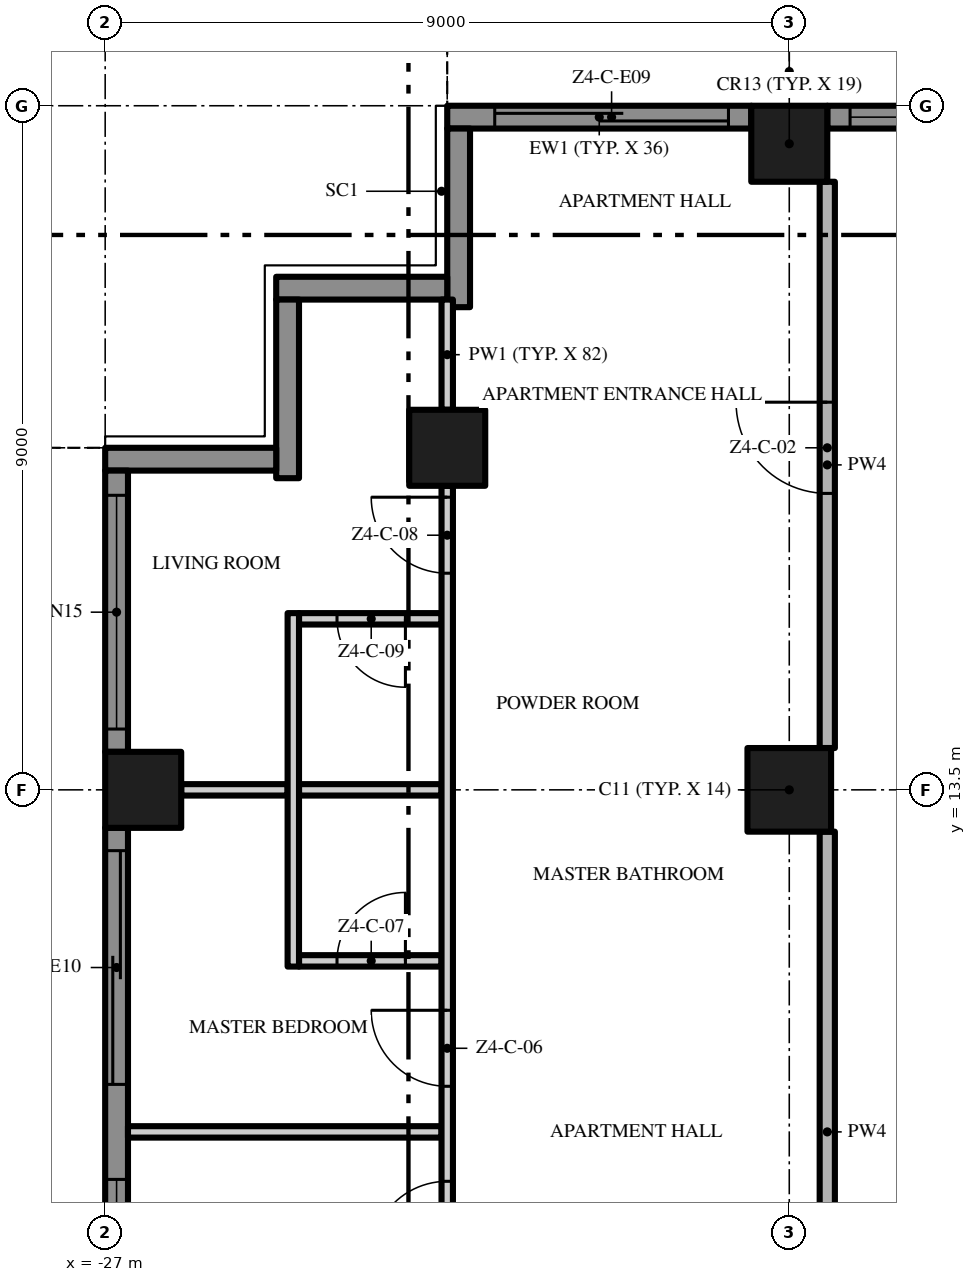
"""IFC4 building model, lengths in metres.
Left out: names, types, materials, properties, quantities, classifications, styles, units other than length and angle.
Written with IfcOpenShell. Run it as: python <this file> out.ifc"""

import sys

from ifc_helpers import new_model, si_unit, direction, frame, frame_2d, origin, origin_2d, place, context, subcontext, project, spatial, polyline, rectangle, outline, extrude, element, fill, save


model = new_model("IFC4")
c1 = context("Model", 3, precision=1e-05, world=origin(), true_north=direction((0.0, 1.0)))
c2 = subcontext(c1, "Body", "Model", "MODEL_VIEW")
j1 = project(units=[si_unit("LENGTHUNIT", "METRE"), si_unit("PLANEANGLEUNIT", "RADIAN")], contexts=[c1])
p1 = place(None, origin())
s1 = spatial("IfcSite", under=j1, at=p1, CompositionType="ELEMENT")
p2 = place(p1, origin())
s2 = spatial("IfcBuilding", under=s1, at=p2, CompositionType="ELEMENT")
p3 = place(p2, frame((0.0, 0.0, 207.2)))
s3 = spatial("IfcBuildingStorey", under=s2, at=p3, CompositionType="ELEMENT", Elevation=207.2)
p4 = place(p3, frame((-18.0, 13.5, 0.0), z_axis=(0.0, 0.0, 1.0), x_axis=(1.0, 0.0, 0.0)))
e1 = element("IfcColumn", 1, at=p4, inside=s3, PredefinedType="COLUMN", context=c2, shape_type="SweptSolid", body=[
    extrude(rectangle(XDim=1.1, YDim=1.1, at=origin_2d()), origin(), (0.0, 0.0, 1.0), 3.5),
])
for number, where, z_axis, x_axis in (
    (2, (-18.0, 22.0, 0.0), (0.0, 0.0, 1.0), (1.0, 0.0, 0.0)),
    (3, (-26.5, 13.5, 0.0), (0.0, 0.0, 1.0), (1.0, 0.0, 0.0)),
    (4, (-22.5, 18.0, 0.0), (0.0, 0.0, 1.0), (1.0, 0.0, 0.0)),
):
    element("IfcColumn", number, at=place(p3, frame(where, z_axis=z_axis, x_axis=x_axis)), inside=s3, PredefinedType="COLUMN", context=c2, shape_type="SweptSolid", body=[
        extrude(rectangle(XDim=1.0, YDim=1.0, at=origin_2d()), origin(), (0.0, 0.0, 1.0), 3.5),
    ])
p5 = place(p3, frame((-17.5, 22.35, 0.0), z_axis=(0.0, 0.0, 1.0), x_axis=(1.0, 0.0, 0.0)))
e5 = element("IfcWall", 5, at=p5, inside=s3, PredefinedType="SOLIDWALL", context=c2, shape_type="SweptSolid", body=[
    extrude(rectangle(XDim=4.0, YDim=0.3, at=frame_2d((2.0, 0.0))), origin(), (0.0, 0.0, 1.0), 3.5),
])
p6 = place(p5, frame((0.3, 0.0, 0.45)))
e6 = element("IfcOpeningElement", 6, at=p6, cuts=e5, PredefinedType="OPENING", context=c2, shape_type="SweptSolid", body=[
    extrude(rectangle(XDim=3.075, YDim=2.65, at=frame_2d((1.538, 1.325))), frame((0.0, 0.16, 0.0), z_axis=(0.0, -1.0, 0.0), x_axis=(1.0, 0.0, 0.0)), (0.0, 0.0, 1.0), 0.32),
])
p7 = place(p3, frame((-22.5, 22.35, 0.0), z_axis=(0.0, 0.0, 1.0), x_axis=(1.0, 0.0, 0.0)))
e7 = element("IfcWall", 7, at=p7, inside=s3, PredefinedType="SOLIDWALL", context=c2, shape_type="SweptSolid", body=[
    extrude(rectangle(XDim=4.0, YDim=0.3, at=frame_2d((2.0, 0.0))), origin(), (0.0, 0.0, 1.0), 3.5),
])
p8 = place(p7, frame((0.625, 0.0, 0.0)))
e8 = element("IfcOpeningElement", 8, at=p8, cuts=e7, PredefinedType="OPENING", context=c2, shape_type="SweptSolid", body=[
    extrude(rectangle(XDim=3.075, YDim=2.4, at=frame_2d((1.538, 1.2))), frame((0.0, 0.16, 0.0), z_axis=(0.0, -1.0, 0.0), x_axis=(1.0, 0.0, 0.0)), (0.0, 0.0, 1.0), 0.32),
])
p9 = place(p3, frame((-22.35, 19.85, 0.0), z_axis=(0.0, 0.0, 1.0), x_axis=(0.0, 1.0, 0.0)))
e9 = element("IfcWall", 9, at=p9, inside=s3, PredefinedType="SOLIDWALL", context=c2, shape_type="SweptSolid", body=[
    extrude(rectangle(XDim=2.35, YDim=0.3, at=frame_2d((1.175, 0.0))), origin(), (0.0, 0.0, 1.0), 3.5),
])
p10 = place(p3, frame((-24.75, 20.1, 0.0), z_axis=(0.0, 0.0, 1.0), x_axis=(1.0, 0.0, 0.0)))
e10 = element("IfcWall", 10, at=p10, inside=s3, PredefinedType="SOLIDWALL", context=c2, shape_type="SweptSolid", body=[
    extrude(rectangle(XDim=2.25, YDim=0.3, at=frame_2d((1.125, 0.0))), origin(), (0.0, 0.0, 1.0), 3.5),
])
p11 = place(p3, frame((-24.6, 17.6, 0.0), z_axis=(0.0, 0.0, 1.0), x_axis=(0.0, 1.0, 0.0)))
e11 = element("IfcWall", 11, at=p11, inside=s3, PredefinedType="SOLIDWALL", context=c2, shape_type="SweptSolid", body=[
    extrude(rectangle(XDim=2.35, YDim=0.3, at=frame_2d((1.175, 0.0))), origin(), (0.0, 0.0, 1.0), 3.5),
])
p12 = place(p3, frame((-27.0, 17.85, 0.0), z_axis=(0.0, 0.0, 1.0), x_axis=(1.0, 0.0, 0.0)))
e12 = element("IfcWall", 12, at=p12, inside=s3, PredefinedType="SOLIDWALL", context=c2, shape_type="SweptSolid", body=[
    extrude(rectangle(XDim=2.25, YDim=0.3, at=frame_2d((1.125, 0.0))), origin(), (0.0, 0.0, 1.0), 3.5),
])
p13 = place(p3, frame((-26.85, 14.0, 0.0), z_axis=(0.0, 0.0, 1.0), x_axis=(0.0, 1.0, 0.0)))
e13 = element("IfcWall", 13, at=p13, inside=s3, PredefinedType="SOLIDWALL", context=c2, shape_type="SweptSolid", body=[
    extrude(rectangle(XDim=3.7, YDim=0.3, at=frame_2d((1.85, 0.0))), origin(), (0.0, 0.0, 1.0), 3.5),
])
p14 = place(p13, frame((0.3, 0.0, 0.45)))
e14 = element("IfcOpeningElement", 14, at=p14, cuts=e13, PredefinedType="OPENING", context=c2, shape_type="SweptSolid", body=[
    extrude(rectangle(XDim=3.075, YDim=2.65, at=frame_2d((1.538, 1.325))), frame((0.0, 0.16, 0.0), z_axis=(0.0, -1.0, 0.0), x_axis=(1.0, 0.0, 0.0)), (0.0, 0.0, 1.0), 0.32),
])
p15 = place(p3, frame((-26.85, 5.0, 0.0), z_axis=(0.0, 0.0, 1.0), x_axis=(0.0, 1.0, 0.0)))
e15 = element("IfcWall", 15, at=p15, inside=s3, PredefinedType="SOLIDWALL", context=c2, shape_type="SweptSolid", body=[
    extrude(rectangle(XDim=8.0, YDim=0.3, at=frame_2d((4.0, 0.0))), origin(), (0.0, 0.0, 1.0), 3.5),
])
p16 = place(p15, frame((4.625, 0.0, 0.0)))
e16 = element("IfcOpeningElement", 16, at=p16, cuts=e15, PredefinedType="OPENING", context=c2, shape_type="SweptSolid", body=[
    extrude(rectangle(XDim=3.075, YDim=2.4, at=frame_2d((1.538, 1.2))), frame((0.0, 0.16, 0.0), z_axis=(0.0, -1.0, 0.0), x_axis=(1.0, 0.0, 0.0)), (0.0, 0.0, 1.0), 0.32),
])
p17 = place(p15, frame((0.3, 0.0, 0.45)))
e17 = element("IfcOpeningElement", 17, at=p17, cuts=e15, PredefinedType="OPENING", context=c2, shape_type="SweptSolid", body=[
    extrude(rectangle(XDim=3.075, YDim=2.65, at=frame_2d((1.538, 1.325))), frame((0.0, 0.16, 0.0), z_axis=(0.0, -1.0, 0.0), x_axis=(1.0, 0.0, 0.0)), (0.0, 0.0, 1.0), 0.32),
])
p18 = place(p3, origin())
e18 = element("IfcWall", 18, at=p18, inside=s3, PredefinedType="USERDEFINED", context=c2, shape_type="SweptSolid", body=[
    extrude(outline(polyline([(-27.951, 18.0), (-28.612, 16.5), (-29.345, 15.0), (-29.869, 13.5), (-30.0, 12.375), (-29.985, 12.0), (-29.649, 10.5), (-28.988, 9.0), (-28.255, 7.5), (-27.731, 6.0), (-27.6, 4.875), (-27.615, 4.5), (-27.951, 3.0), (-28.612, 1.5), (-29.345, 0.0), (-29.869, -1.5), (-30.0, -2.625), (-29.985, -3.0), (-29.649, -4.5), (-28.988, -6.0), (-28.255, -7.5), (-27.731, -9.0), (-27.6, -10.125), (-27.615, -10.5), (-27.951, -12.0), (-28.612, -13.5), (-29.345, -15.0), (-29.869, -16.5), (-30.0, -17.625), (-29.985, -18.0), (-29.735, -17.99), (-29.749, -17.635), (-29.624, -16.556), (-29.114, -15.096), (-28.385, -13.605), (-27.713, -12.079), (-27.366, -10.533), (-27.349, -10.115), (-27.486, -8.944), (-28.024, -7.404), (-28.761, -5.895), (-29.41, -4.421), (-29.736, -2.967), (-29.749, -2.635), (-29.624, -1.556), (-29.114, -0.096), (-28.385, 1.395), (-27.713, 2.921), (-27.366, 4.467), (-27.349, 4.885), (-27.486, 6.056), (-28.024, 7.596), (-28.761, 9.105), (-29.41, 10.579), (-29.736, 12.033), (-29.749, 12.365), (-29.624, 13.444), (-29.114, 14.904), (-28.385, 16.395), (-27.723, 17.899), (-27.951, 18.0)])), origin(), (0.0, 0.0, 1.0), 0.9),
])
p19 = place(p3, frame((-26.7, 9.0, 0.0), z_axis=(0.0, 0.0, 1.0), x_axis=(1.0, 0.0, 0.0)))
e19 = element("IfcWall", 19, at=p19, inside=s3, PredefinedType="PARTITIONING", context=c2, shape_type="SweptSolid", body=[
    extrude(rectangle(XDim=4.125, YDim=0.15, at=frame_2d((2.062, 0.0))), origin(), (0.0, 0.0, 1.0), 3.5),
])
p20 = place(p3, frame((-24.45, 11.25, 0.0), z_axis=(0.0, 0.0, 1.0), x_axis=(1.0, 0.0, 0.0)))
e20 = element("IfcWall", 20, at=p20, inside=s3, PredefinedType="PARTITIONING", context=c2, shape_type="SweptSolid", body=[
    extrude(rectangle(XDim=1.875, YDim=0.15, at=frame_2d((0.938, 0.0))), origin(), (0.0, 0.0, 1.0), 3.5),
])
p21 = place(p20, frame((0.5, 0.0, 0.0)))
e21 = element("IfcOpeningElement", 21, at=p21, cuts=e20, PredefinedType="OPENING", context=c2, shape_type="SweptSolid", body=[
    extrude(rectangle(XDim=0.9, YDim=2.1, at=frame_2d((0.45, 1.05))), frame((0.0, 0.085, 0.0), z_axis=(0.0, -1.0, 0.0), x_axis=(1.0, 0.0, 0.0)), (0.0, 0.0, 1.0), 0.17),
])
p22 = place(p3, frame((-26.0, 13.5, 0.0), z_axis=(0.0, 0.0, 1.0), x_axis=(1.0, 0.0, 0.0)))
e22 = element("IfcWall", 22, at=p22, inside=s3, PredefinedType="PARTITIONING", context=c2, shape_type="SweptSolid", body=[
    extrude(rectangle(XDim=1.4, YDim=0.15, at=frame_2d((0.7, 0.0))), origin(), (0.0, 0.0, 1.0), 3.5),
])
p23 = place(p3, frame((-24.45, 13.5, 0.0), z_axis=(0.0, 0.0, 1.0), x_axis=(1.0, 0.0, 0.0)))
e23 = element("IfcWall", 23, at=p23, inside=s3, PredefinedType="PARTITIONING", context=c2, shape_type="SweptSolid", body=[
    extrude(rectangle(XDim=1.875, YDim=0.15, at=frame_2d((0.938, 0.0))), origin(), (0.0, 0.0, 1.0), 3.5),
])
p24 = place(p3, frame((-22.575, 15.75, 0.0), z_axis=(0.0, 0.0, 1.0), x_axis=(-1.0, 0.0, 0.0)))
e24 = element("IfcWall", 24, at=p24, inside=s3, PredefinedType="PARTITIONING", context=c2, shape_type="SweptSolid", body=[
    extrude(rectangle(XDim=1.875, YDim=0.15, at=frame_2d((0.938, 0.0))), origin(), (0.0, 0.0, 1.0), 3.5),
])
p25 = place(p24, frame((0.475, 0.0, 0.0)))
e25 = element("IfcOpeningElement", 25, at=p25, cuts=e24, PredefinedType="OPENING", context=c2, shape_type="SweptSolid", body=[
    extrude(rectangle(XDim=0.9, YDim=2.1, at=frame_2d((0.45, 1.05))), frame((0.0, 0.085, 0.0), z_axis=(0.0, -1.0, 0.0), x_axis=(1.0, 0.0, 0.0)), (0.0, 0.0, 1.0), 0.17),
])
p26 = place(p3, frame((-24.525, 11.175, 0.0), z_axis=(0.0, 0.0, 1.0), x_axis=(0.0, 1.0, 0.0)))
e26 = element("IfcWall", 26, at=p26, inside=s3, PredefinedType="PARTITIONING", context=c2, shape_type="SweptSolid", body=[
    extrude(rectangle(XDim=4.65, YDim=0.15, at=frame_2d((2.325, 0.0))), origin(), (0.0, 0.0, 1.0), 3.5),
])
p27 = place(p3, frame((-22.5, 0.1, 0.0), z_axis=(0.0, 0.0, 1.0), x_axis=(0.0, 1.0, 0.0)))
e27 = element("IfcWall", 27, at=p27, inside=s3, PredefinedType="PARTITIONING", context=c2, shape_type="SweptSolid", body=[
    extrude(rectangle(XDim=17.4, YDim=0.15, at=frame_2d((8.7, 0.0))), origin(), (0.0, 0.0, 1.0), 3.5),
])
p28 = place(p27, frame((1.65, 0.0, 0.0)))
e28 = element("IfcOpeningElement", 28, at=p28, cuts=e27, PredefinedType="OPENING", context=c2, shape_type="SweptSolid", body=[
    extrude(rectangle(XDim=1.0, YDim=2.4, at=frame_2d((0.5, 1.2))), frame((0.0, 0.085, 0.0), z_axis=(0.0, -1.0, 0.0), x_axis=(1.0, 0.0, 0.0)), (0.0, 0.0, 1.0), 0.17),
])
p29 = place(p27, frame((7.25, 0.0, 0.0)))
e29 = element("IfcOpeningElement", 29, at=p29, cuts=e27, PredefinedType="OPENING", context=c2, shape_type="SweptSolid", body=[
    extrude(rectangle(XDim=1.0, YDim=2.4, at=frame_2d((0.5, 1.2))), frame((0.0, 0.085, 0.0), z_axis=(0.0, -1.0, 0.0), x_axis=(1.0, 0.0, 0.0)), (0.0, 0.0, 1.0), 0.17),
])
p30 = place(p27, frame((9.5, 0.0, 0.0)))
e30 = element("IfcOpeningElement", 30, at=p30, cuts=e27, PredefinedType="OPENING", context=c2, shape_type="SweptSolid", body=[
    extrude(rectangle(XDim=1.0, YDim=2.4, at=frame_2d((0.5, 1.2))), frame((0.0, 0.085, 0.0), z_axis=(0.0, -1.0, 0.0), x_axis=(1.0, 0.0, 0.0)), (0.0, 0.0, 1.0), 0.17),
])
p31 = place(p27, frame((16.25, 0.0, 0.0)))
e31 = element("IfcOpeningElement", 31, at=p31, cuts=e27, PredefinedType="OPENING", context=c2, shape_type="SweptSolid", body=[
    extrude(rectangle(XDim=1.0, YDim=2.4, at=frame_2d((0.5, 1.2))), frame((0.0, 0.085, 0.0), z_axis=(0.0, -1.0, 0.0), x_axis=(1.0, 0.0, 0.0)), (0.0, 0.0, 1.0), 0.17),
])
p32 = place(p3, frame((-22.5, 18.5, 0.0), z_axis=(0.0, 0.0, 1.0), x_axis=(0.0, 1.0, 0.0)))
e32 = element("IfcWall", 32, at=p32, inside=s3, PredefinedType="PARTITIONING", context=c2, shape_type="SweptSolid", body=[
    extrude(rectangle(XDim=1.45, YDim=0.15, at=frame_2d((0.725, 0.0))), origin(), (0.0, 0.0, 1.0), 3.5),
])
p33 = place(p3, frame((-17.5, 5.05, 0.0), z_axis=(0.0, 0.0, 1.0), x_axis=(0.0, 1.0, 0.0)))
e33 = element("IfcWall", 33, at=p33, inside=s3, PredefinedType="PARTITIONING", context=c2, shape_type="SweptSolid", body=[
    extrude(rectangle(XDim=7.9, YDim=0.2, at=frame_2d((3.95, 0.0))), origin(), (0.0, 0.0, 1.0), 3.5),
])
p34 = place(p3, frame((-17.5, 14.05, 0.0), z_axis=(0.0, 0.0, 1.0), x_axis=(0.0, 1.0, 0.0)))
e34 = element("IfcWall", 34, at=p34, inside=s3, PredefinedType="PARTITIONING", context=c2, shape_type="SweptSolid", body=[
    extrude(rectangle(XDim=7.45, YDim=0.2, at=frame_2d((3.725, 0.0))), origin(), (0.0, 0.0, 1.0), 3.5),
])
p35 = place(p34, frame((3.35, 0.0, 0.0)))
e35 = element("IfcOpeningElement", 35, at=p35, cuts=e34, PredefinedType="OPENING", context=c2, shape_type="SweptSolid", body=[
    extrude(rectangle(XDim=1.2, YDim=2.4, at=frame_2d((0.6, 1.2))), frame((0.0, 0.11, 0.0), z_axis=(0.0, -1.0, 0.0), x_axis=(1.0, 0.0, 0.0)), (0.0, 0.0, 1.0), 0.22),
])
p36 = place(p6, origin())
e36 = element("IfcWindow", 36, at=p36, inside=s3, PartitioningType="SINGLE_PANEL", PredefinedType="WINDOW", context=c2, shape_type="SweptSolid", body=[
    extrude(rectangle(XDim=3.075, YDim=2.65, at=frame_2d((1.538, 1.325))), frame((0.0, 0.03, 0.0), z_axis=(0.0, -1.0, 0.0), x_axis=(1.0, 0.0, 0.0)), (0.0, 0.0, 1.0), 0.06),
])
fill(e6, e36)
p37 = place(p8, origin())
e37 = element("IfcDoor", 37, at=p37, inside=s3, OperationType="SINGLE_SWING_LEFT", PredefinedType="DOOR", context=c2, shape_type="SweptSolid", body=[
    extrude(rectangle(XDim=3.075, YDim=2.4, at=frame_2d((1.538, 1.2))), frame((0.0, 0.025, 0.0), z_axis=(0.0, -1.0, 0.0), x_axis=(1.0, 0.0, 0.0)), (0.0, 0.0, 1.0), 0.05),
])
fill(e8, e37)
p38 = place(p14, origin())
e38 = element("IfcWindow", 38, at=p38, inside=s3, PartitioningType="SINGLE_PANEL", PredefinedType="WINDOW", context=c2, shape_type="SweptSolid", body=[
    extrude(rectangle(XDim=3.075, YDim=2.65, at=frame_2d((1.538, 1.325))), frame((0.0, 0.03, 0.0), z_axis=(0.0, -1.0, 0.0), x_axis=(1.0, 0.0, 0.0)), (0.0, 0.0, 1.0), 0.06),
])
fill(e14, e38)
p39 = place(p16, origin())
e39 = element("IfcDoor", 39, at=p39, inside=s3, OperationType="SINGLE_SWING_LEFT", PredefinedType="DOOR", context=c2, shape_type="SweptSolid", body=[
    extrude(rectangle(XDim=3.075, YDim=2.4, at=frame_2d((1.538, 1.2))), frame((0.0, 0.025, 0.0), z_axis=(0.0, -1.0, 0.0), x_axis=(1.0, 0.0, 0.0)), (0.0, 0.0, 1.0), 0.05),
])
fill(e16, e39)
p40 = place(p17, origin())
e40 = element("IfcWindow", 40, at=p40, inside=s3, PartitioningType="SINGLE_PANEL", PredefinedType="WINDOW", context=c2, shape_type="SweptSolid", body=[
    extrude(rectangle(XDim=3.075, YDim=2.65, at=frame_2d((1.538, 1.325))), frame((0.0, 0.03, 0.0), z_axis=(0.0, -1.0, 0.0), x_axis=(1.0, 0.0, 0.0)), (0.0, 0.0, 1.0), 0.06),
])
fill(e17, e40)
p41 = place(p35, origin())
e41 = element("IfcDoor", 41, at=p41, inside=s3, OperationType="SINGLE_SWING_RIGHT", PredefinedType="DOOR", context=c2, shape_type="SweptSolid", body=[
    extrude(rectangle(XDim=1.2, YDim=2.4, at=frame_2d((0.6, 1.2))), frame((0.0, 0.025, 0.0), z_axis=(0.0, -1.0, 0.0), x_axis=(1.0, 0.0, 0.0)), (0.0, 0.0, 1.0), 0.05),
])
fill(e35, e41)
p42 = place(p29, origin())
e42 = element("IfcDoor", 42, at=p42, inside=s3, OperationType="SINGLE_SWING_LEFT", PredefinedType="DOOR", context=c2, shape_type="SweptSolid", body=[
    extrude(rectangle(XDim=1.0, YDim=2.4, at=frame_2d((0.5, 1.2))), frame((0.0, 0.025, 0.0), z_axis=(0.0, -1.0, 0.0), x_axis=(1.0, 0.0, 0.0)), (0.0, 0.0, 1.0), 0.05),
])
fill(e29, e42)
p43 = place(p30, origin())
e43 = element("IfcDoor", 43, at=p43, inside=s3, OperationType="SINGLE_SWING_RIGHT", PredefinedType="DOOR", context=c2, shape_type="SweptSolid", body=[
    extrude(rectangle(XDim=1.0, YDim=2.4, at=frame_2d((0.5, 1.2))), frame((0.0, 0.025, 0.0), z_axis=(0.0, -1.0, 0.0), x_axis=(1.0, 0.0, 0.0)), (0.0, 0.0, 1.0), 0.05),
])
fill(e30, e43)
p44 = place(p21, origin())
e44 = element("IfcDoor", 44, at=p44, inside=s3, OperationType="SINGLE_SWING_RIGHT", PredefinedType="DOOR", context=c2, shape_type="SweptSolid", body=[
    extrude(rectangle(XDim=0.9, YDim=2.1, at=frame_2d((0.45, 1.05))), frame((0.0, 0.025, 0.0), z_axis=(0.0, -1.0, 0.0), x_axis=(1.0, 0.0, 0.0)), (0.0, 0.0, 1.0), 0.05),
])
fill(e21, e44)
p45 = place(p31, origin())
e45 = element("IfcDoor", 45, at=p45, inside=s3, OperationType="SINGLE_SWING_RIGHT", PredefinedType="DOOR", context=c2, shape_type="SweptSolid", body=[
    extrude(rectangle(XDim=1.0, YDim=2.4, at=frame_2d((0.5, 1.2))), frame((0.0, 0.025, 0.0), z_axis=(0.0, -1.0, 0.0), x_axis=(1.0, 0.0, 0.0)), (0.0, 0.0, 1.0), 0.05),
])
fill(e31, e45)
p46 = place(p25, origin())
e46 = element("IfcDoor", 46, at=p46, inside=s3, OperationType="SINGLE_SWING_LEFT", PredefinedType="DOOR", context=c2, shape_type="SweptSolid", body=[
    extrude(rectangle(XDim=0.9, YDim=2.1, at=frame_2d((0.45, 1.05))), frame((0.0, 0.025, 0.0), z_axis=(0.0, -1.0, 0.0), x_axis=(1.0, 0.0, 0.0)), (0.0, 0.0, 1.0), 0.05),
])
fill(e25, e46)
save(model, sys.argv[1])
